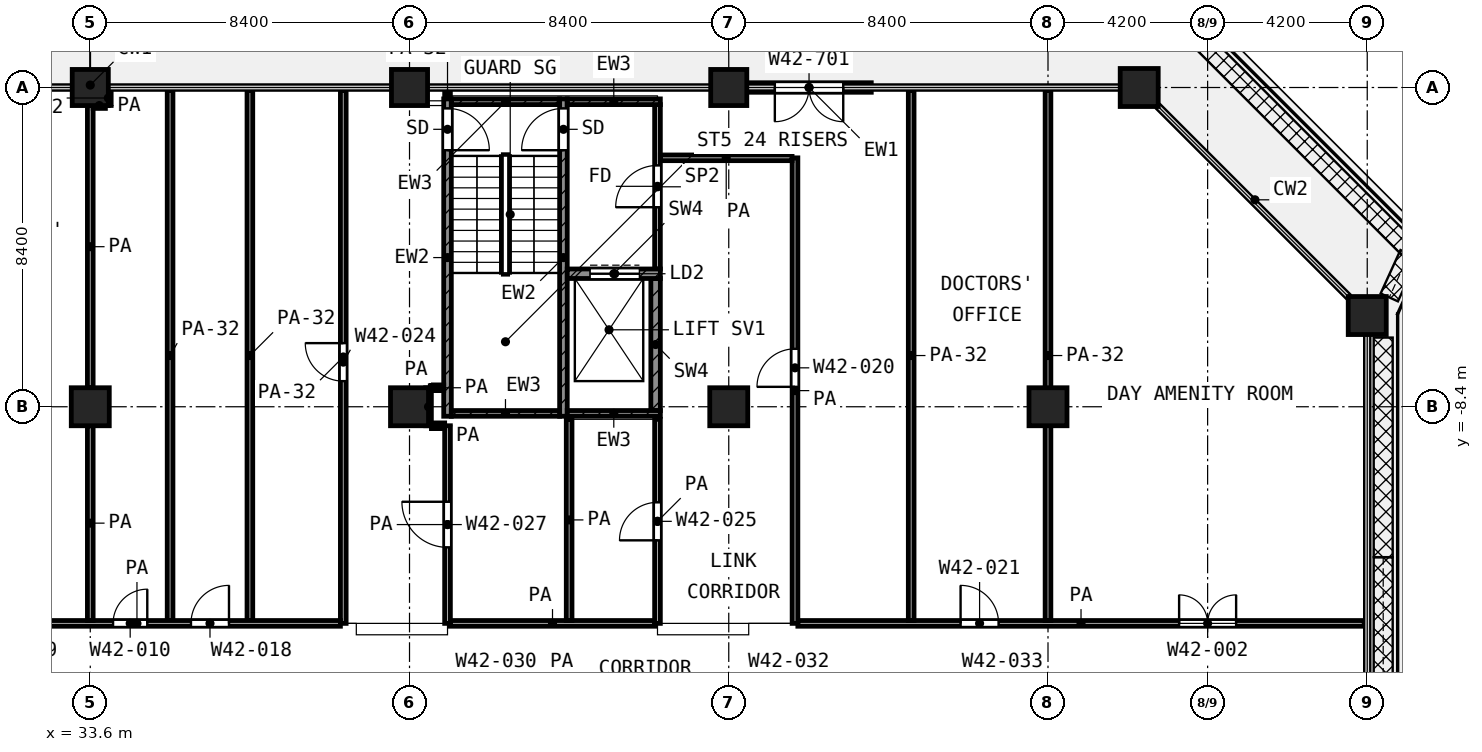
"""IFC4 building model, lengths in metres.
Left out: names, types, materials, properties, quantities, classifications, styles, units other than length and angle.
Written with IfcOpenShell. Run it as: python <this file> out.ifc"""

import sys

from ifc_helpers import new_model, si_unit, direction, frame, frame_2d, origin, origin_2d, place, context, subcontext, project, spatial, rectangle, extrude, element, fill, save


model = new_model("IFC4")
c1 = context("Model", 3, precision=1e-05, world=origin(), true_north=direction((0.0, 1.0)))
c2 = subcontext(c1, "Body", "Model", "MODEL_VIEW")
j1 = project(units=[si_unit("LENGTHUNIT", "METRE"), si_unit("PLANEANGLEUNIT", "RADIAN")], contexts=[c1])
p1 = place(None, origin())
s1 = spatial("IfcSite", under=j1, at=p1, CompositionType="ELEMENT")
p2 = place(p1, origin())
s2 = spatial("IfcBuilding", under=s1, at=p2, CompositionType="ELEMENT")
p3 = place(p2, frame((0.0, 0.0, 183.6)))
s3 = spatial("IfcBuildingStorey", under=s2, at=p3, CompositionType="ELEMENT", Elevation=183.6)
for number, where, z_axis, x_axis in (
    (1, (33.6, 0.0, 0.0), (0.0, 0.0, 1.0), (1.0, 0.0, 0.0)),
    (2, (42.0, 0.0, 0.0), (0.0, 0.0, 1.0), (1.0, 0.0, 0.0)),
    (3, (50.4, 0.0, 0.0), (0.0, 0.0, 1.0), (1.0, 0.0, 0.0)),
):
    element("IfcColumn", number, at=place(p3, frame(where, z_axis=z_axis, x_axis=x_axis)), inside=s3, PredefinedType="COLUMN", context=c2, shape_type="SweptSolid", body=[
        extrude(rectangle(XDim=0.95, YDim=0.95, at=origin_2d()), origin(), (0.0, 0.0, 1.0), 4.2),
    ])
for number, where, z_axis, x_axis in (
    (4, (61.2, 0.0, 0.0), (0.0, 0.0, 1.0), (1.0, 0.0, 0.0)),
    (5, (67.2, -6.0, 0.0), (0.0, 0.0, 1.0), (1.0, 0.0, 0.0)),
    (6, (33.6, -8.4, 0.0), (0.0, 0.0, 1.0), (1.0, 0.0, 0.0)),
    (7, (42.0, -8.4, 0.0), (0.0, 0.0, 1.0), (1.0, 0.0, 0.0)),
    (8, (50.4, -8.4, 0.0), (0.0, 0.0, 1.0), (1.0, 0.0, 0.0)),
    (9, (58.8, -8.4, 0.0), (0.0, 0.0, 1.0), (1.0, 0.0, 0.0)),
):
    element("IfcColumn", number, at=place(p3, frame(where, z_axis=z_axis, x_axis=x_axis)), inside=s3, PredefinedType="COLUMN", context=c2, shape_type="SweptSolid", body=[
        extrude(rectangle(XDim=1.0, YDim=1.0, at=origin_2d()), origin(), (0.0, 0.0, 1.0), 4.2),
    ])
p4 = place(p3, frame((54.15, 0.0, 0.0), z_axis=(0.0, 0.0, 1.0), x_axis=(-1.0, 0.0, 0.0)))
e10 = element("IfcWall", 10, at=p4, inside=s3, PredefinedType="SOLIDWALL", context=c2, shape_type="SweptSolid", body=[
    extrude(rectangle(XDim=3.275, YDim=0.25, at=frame_2d((1.637, 0.0))), origin(), (0.0, 0.0, 1.0), 2.58),
])
p5 = place(p4, frame((0.738, 0.0, 0.0)))
e11 = element("IfcOpeningElement", 11, at=p5, cuts=e10, PredefinedType="OPENING", context=c2, shape_type="SweptSolid", body=[
    extrude(rectangle(XDim=1.8, YDim=2.1, at=frame_2d((0.9, 1.05))), frame((0.0, 0.135, 0.0), z_axis=(0.0, -1.0, 0.0), x_axis=(1.0, 0.0, 0.0)), (0.0, 0.0, 1.0), 0.27),
])
p6 = place(p3, frame((43.0, -8.65, 0.0), z_axis=(0.0, 0.0, 1.0), x_axis=(0.0, 1.0, 0.0)))
e12 = element("IfcWall", 12, at=p6, inside=s3, PredefinedType="SHEAR", context=c2, shape_type="SweptSolid", body=[
    extrude(rectangle(XDim=8.35, YDim=0.2, at=frame_2d((4.175, 0.0))), origin(), (0.0, 0.0, 1.0), 3.6),
])
p7 = place(p6, frame((7.0, 0.0, 0.0)))
e13 = element("IfcOpeningElement", 13, at=p7, cuts=e12, PredefinedType="OPENING", context=c2, shape_type="SweptSolid", body=[
    extrude(rectangle(XDim=1.1, YDim=2.1, at=frame_2d((0.55, 1.05))), frame((0.0, 0.11, 0.0), z_axis=(0.0, -1.0, 0.0), x_axis=(1.0, 0.0, 0.0)), (0.0, 0.0, 1.0), 0.22),
])
p8 = place(p3, frame((46.05, -8.65, 0.0), z_axis=(0.0, 0.0, 1.0), x_axis=(0.0, 1.0, 0.0)))
e14 = element("IfcWall", 14, at=p8, inside=s3, PredefinedType="SHEAR", context=c2, shape_type="SweptSolid", body=[
    extrude(rectangle(XDim=8.35, YDim=0.2, at=frame_2d((4.175, 0.0))), origin(), (0.0, 0.0, 1.0), 3.6),
])
p9 = place(p8, frame((7.0, 0.0, 0.0)))
e15 = element("IfcOpeningElement", 15, at=p9, cuts=e14, PredefinedType="OPENING", context=c2, shape_type="SweptSolid", body=[
    extrude(rectangle(XDim=1.1, YDim=2.1, at=frame_2d((0.55, 1.05))), frame((0.0, 0.11, 0.0), z_axis=(0.0, -1.0, 0.0), x_axis=(1.0, 0.0, 0.0)), (0.0, 0.0, 1.0), 0.22),
])
p10 = place(p3, frame((43.1, -0.375, 0.0), z_axis=(0.0, 0.0, 1.0), x_axis=(1.0, 0.0, 0.0)))
e16 = element("IfcWall", 16, at=p10, inside=s3, PredefinedType="SHEAR", context=c2, shape_type="SweptSolid", body=[
    extrude(rectangle(XDim=2.85, YDim=0.15, at=frame_2d((1.425, 0.0))), origin(), (0.0, 0.0, 1.0), 3.6),
])
p11 = place(p3, frame((46.15, -0.375, 0.0), z_axis=(0.0, 0.0, 1.0), x_axis=(1.0, 0.0, 0.0)))
e17 = element("IfcWall", 17, at=p11, inside=s3, PredefinedType="SHEAR", context=c2, shape_type="SweptSolid", body=[
    extrude(rectangle(XDim=2.45, YDim=0.15, at=frame_2d((1.225, 0.0))), origin(), (0.0, 0.0, 1.0), 3.6),
])
p12 = place(p3, frame((43.1, -8.575, 0.0), z_axis=(0.0, 0.0, 1.0), x_axis=(1.0, 0.0, 0.0)))
e18 = element("IfcWall", 18, at=p12, inside=s3, PredefinedType="SHEAR", context=c2, shape_type="SweptSolid", body=[
    extrude(rectangle(XDim=2.85, YDim=0.15, at=frame_2d((1.425, 0.0))), origin(), (0.0, 0.0, 1.0), 3.6),
])
p13 = place(p3, frame((46.15, -8.575, 0.0), z_axis=(0.0, 0.0, 1.0), x_axis=(1.0, 0.0, 0.0)))
e19 = element("IfcWall", 19, at=p13, inside=s3, PredefinedType="SHEAR", context=c2, shape_type="SweptSolid", body=[
    extrude(rectangle(XDim=2.45, YDim=0.15, at=frame_2d((1.225, 0.0))), origin(), (0.0, 0.0, 1.0), 3.6),
])
p14 = place(p3, frame((46.15, -4.9, 0.0), z_axis=(0.0, 0.0, 1.0), x_axis=(1.0, 0.0, 0.0)))
e20 = element("IfcWall", 20, at=p14, inside=s3, PredefinedType="SHEAR", context=c2, shape_type="SweptSolid", body=[
    extrude(rectangle(XDim=2.45, YDim=0.25, at=frame_2d((1.225, 0.0))), origin(), (0.0, 0.0, 1.0), 3.6),
])
p15 = place(p14, frame((0.6, 0.0, 0.0)))
e21 = element("IfcOpeningElement", 21, at=p15, cuts=e20, PredefinedType="OPENING", context=c2, shape_type="SweptSolid", body=[
    extrude(rectangle(XDim=1.3, YDim=2.1, at=frame_2d((0.65, 1.05))), frame((0.0, 0.135, 0.0), z_axis=(0.0, -1.0, 0.0), x_axis=(1.0, 0.0, 0.0)), (0.0, 0.0, 1.0), 0.27),
])
p16 = place(p3, frame((48.475, -8.5, 0.0), z_axis=(0.0, 0.0, 1.0), x_axis=(0.0, 1.0, 0.0)))
e22 = element("IfcWall", 22, at=p16, inside=s3, PredefinedType="SHEAR", context=c2, shape_type="SweptSolid", body=[
    extrude(rectangle(XDim=3.475, YDim=0.25, at=frame_2d((1.738, 0.0))), origin(), (0.0, 0.0, 1.0), 3.6),
])
p17 = place(p3, frame((48.525, -4.775, 0.0), z_axis=(0.0, 0.0, 1.0), x_axis=(0.0, 1.0, 0.0)))
e23 = element("IfcWall", 23, at=p17, inside=s3, PredefinedType="PARTITIONING", context=c2, shape_type="SweptSolid", body=[
    extrude(rectangle(XDim=4.325, YDim=0.15, at=frame_2d((2.163, 0.0))), origin(), (0.0, 0.0, 1.0), 3.6),
])
p18 = place(p17, frame((1.625, 0.0, 0.0)))
e24 = element("IfcOpeningElement", 24, at=p18, cuts=e23, PredefinedType="OPENING", context=c2, shape_type="SweptSolid", body=[
    extrude(rectangle(XDim=1.1, YDim=2.1, at=frame_2d((0.55, 1.05))), frame((0.0, 0.085, 0.0), z_axis=(0.0, -1.0, 0.0), x_axis=(1.0, 0.0, 0.0)), (0.0, 0.0, 1.0), 0.17),
])
p19 = place(p3, frame((29.475, -14.1, 0.0), z_axis=(0.0, 0.0, 1.0), x_axis=(1.0, 0.0, 0.0)))
e25 = element("IfcWall", 25, at=p19, inside=s3, PredefinedType="PARTITIONING", context=c2, shape_type="SweptSolid", body=[
    extrude(rectangle(XDim=10.707, YDim=0.15, at=frame_2d((5.354, 0.0))), origin(), (0.0, 0.0, 1.0), 3.6),
])
p20 = place(p19, frame((1.675, 0.0, 0.0)))
e26 = element("IfcOpeningElement", 26, at=p20, cuts=e25, PredefinedType="OPENING", context=c2, shape_type="SweptSolid", body=[
    extrude(rectangle(XDim=1.0, YDim=2.1, at=frame_2d((0.5, 1.05))), frame((0.0, 0.085, 0.0), z_axis=(0.0, -1.0, 0.0), x_axis=(1.0, 0.0, 0.0)), (0.0, 0.0, 1.0), 0.17),
])
p21 = place(p19, frame((4.725, 0.0, 0.0)))
e27 = element("IfcOpeningElement", 27, at=p21, cuts=e25, PredefinedType="OPENING", context=c2, shape_type="SweptSolid", body=[
    extrude(rectangle(XDim=0.9, YDim=2.1, at=frame_2d((0.45, 1.05))), frame((0.0, 0.085, 0.0), z_axis=(0.0, -1.0, 0.0), x_axis=(1.0, 0.0, 0.0)), (0.0, 0.0, 1.0), 0.17),
])
p22 = place(p19, frame((6.775, 0.0, 0.0)))
e28 = element("IfcOpeningElement", 28, at=p22, cuts=e25, PredefinedType="OPENING", context=c2, shape_type="SweptSolid", body=[
    extrude(rectangle(XDim=1.0, YDim=2.1, at=frame_2d((0.5, 1.05))), frame((0.0, 0.085, 0.0), z_axis=(0.0, -1.0, 0.0), x_axis=(1.0, 0.0, 0.0)), (0.0, 0.0, 1.0), 0.17),
])
p23 = place(p3, frame((43.075, -14.1, 0.0), z_axis=(0.0, 0.0, 1.0), x_axis=(1.0, 0.0, 0.0)))
e29 = element("IfcWall", 29, at=p23, inside=s3, PredefinedType="PARTITIONING", context=c2, shape_type="SweptSolid", body=[
    extrude(rectangle(XDim=5.375, YDim=0.15, at=frame_2d((2.688, 0.0))), origin(), (0.0, 0.0, 1.0), 3.6),
])
p24 = place(p3, frame((52.218, -14.1, 0.0), z_axis=(0.0, 0.0, 1.0), x_axis=(1.0, 0.0, 0.0)))
e30 = element("IfcWall", 30, at=p24, inside=s3, PredefinedType="PARTITIONING", context=c2, shape_type="SweptSolid", body=[
    extrude(rectangle(XDim=14.902, YDim=0.15, at=frame_2d((7.451, 0.0))), origin(), (0.0, 0.0, 1.0), 3.6),
])
p25 = place(p24, frame((4.282, 0.0, 0.0)))
e31 = element("IfcOpeningElement", 31, at=p25, cuts=e30, PredefinedType="OPENING", context=c2, shape_type="SweptSolid", body=[
    extrude(rectangle(XDim=1.0, YDim=2.1, at=frame_2d((0.5, 1.05))), frame((0.0, 0.085, 0.0), z_axis=(0.0, -1.0, 0.0), x_axis=(1.0, 0.0, 0.0)), (0.0, 0.0, 1.0), 0.17),
])
p26 = place(p24, frame((10.032, 0.0, 0.0)))
e32 = element("IfcOpeningElement", 32, at=p26, cuts=e30, PredefinedType="OPENING", context=c2, shape_type="SweptSolid", body=[
    extrude(rectangle(XDim=1.5, YDim=2.1, at=frame_2d((0.75, 1.05))), frame((0.0, 0.085, 0.0), z_axis=(0.0, -1.0, 0.0), x_axis=(1.0, 0.0, 0.0)), (0.0, 0.0, 1.0), 0.17),
])
p27 = place(p3, frame((42.577, -8.9, 0.0), z_axis=(0.0, 0.0, 1.0), x_axis=(1.0, 0.0, 0.0)))
e33 = element("IfcWall", 33, at=p27, inside=s3, PredefinedType="PARTITIONING", context=c2, shape_type="SweptSolid", body=[
    extrude(rectangle(XDim=0.348, YDim=0.15, at=frame_2d((0.174, 0.0))), origin(), (0.0, 0.0, 1.0), 3.6),
])
p28 = place(p3, frame((42.577, -7.9, 0.0), z_axis=(0.0, 0.0, 1.0), x_axis=(1.0, 0.0, 0.0)))
e34 = element("IfcWall", 34, at=p28, inside=s3, PredefinedType="PARTITIONING", context=c2, shape_type="SweptSolid", body=[
    extrude(rectangle(XDim=0.323, YDim=0.15, at=frame_2d((0.162, 0.0))), origin(), (0.0, 0.0, 1.0), 3.6),
])
p29 = place(p3, frame((48.6, -1.85, 0.0), z_axis=(0.0, 0.0, 1.0), x_axis=(1.0, 0.0, 0.0)))
e35 = element("IfcWall", 35, at=p29, inside=s3, PredefinedType="PARTITIONING", context=c2, shape_type="SweptSolid", body=[
    extrude(rectangle(XDim=3.466, YDim=0.15, at=frame_2d((1.733, 0.0))), origin(), (0.0, 0.0, 1.0), 3.6),
])
p30 = place(p3, frame((33.677, -0.475, 0.0), z_axis=(0.0, 0.0, 1.0), x_axis=(1.0, 0.0, 0.0)))
e36 = element("IfcWall", 36, at=p30, inside=s3, PredefinedType="PARTITIONING", context=c2, shape_type="SweptSolid", body=[
    extrude(rectangle(XDim=0.321, YDim=0.15, at=frame_2d((0.161, 0.0))), origin(), (0.0, 0.0, 1.0), 3.6),
])
p31 = place(p3, frame((33.6, -14.025, 0.0), z_axis=(0.0, 0.0, 1.0), x_axis=(0.0, 1.0, 0.0)))
e37 = element("IfcWall", 37, at=p31, inside=s3, PredefinedType="PARTITIONING", context=c2, shape_type="SweptSolid", body=[
    extrude(rectangle(XDim=5.125, YDim=0.15, at=frame_2d((2.562, 0.0))), origin(), (0.0, 0.0, 1.0), 3.6),
])
p32 = place(p3, frame((33.6, -7.9, 0.0), z_axis=(0.0, 0.0, 1.0), x_axis=(0.0, 1.0, 0.0)))
e38 = element("IfcWall", 38, at=p32, inside=s3, PredefinedType="PARTITIONING", context=c2, shape_type="SweptSolid", body=[
    extrude(rectangle(XDim=7.423, YDim=0.15, at=frame_2d((3.711, 0.0))), origin(), (0.0, 0.0, 1.0), 3.6),
])
p33 = place(p3, frame((34.075, -0.473, 0.0), z_axis=(0.0, 0.0, 1.0), x_axis=(0.0, 1.0, 0.0)))
e39 = element("IfcWall", 39, at=p33, inside=s3, PredefinedType="PARTITIONING", context=c2, shape_type="SweptSolid", body=[
    extrude(rectangle(XDim=0.393, YDim=0.15, at=frame_2d((0.196, 0.0))), origin(), (0.0, 0.0, 1.0), 2.7),
])
for number, where, z_axis, x_axis in (
    (40, (35.7, -14.025, 0.0), (0.0, 0.0, 1.0), (0.0, 1.0, 0.0)),
    (41, (37.8, -14.025, 0.0), (0.0, 0.0, 1.0), (0.0, 1.0, 0.0)),
):
    element("IfcWall", number, at=place(p3, frame(where, z_axis=z_axis, x_axis=x_axis)), inside=s3, PredefinedType="PARTITIONING", context=c2, shape_type="SweptSolid", body=[
        extrude(rectangle(XDim=13.945, YDim=0.15, at=frame_2d((6.972, 0.0))), origin(), (0.0, 0.0, 1.0), 2.7),
    ])
p34 = place(p3, frame((40.257, -14.1, 0.0), z_axis=(0.0, 0.0, 1.0), x_axis=(0.0, 1.0, 0.0)))
e42 = element("IfcWall", 42, at=p34, inside=s3, PredefinedType="PARTITIONING", context=c2, shape_type="SweptSolid", body=[
    extrude(rectangle(XDim=14.02, YDim=0.15, at=frame_2d((7.01, 0.0))), origin(), (0.0, 0.0, 1.0), 2.7),
])
p35 = place(p34, frame((6.374, 0.0, 0.0)))
e43 = element("IfcOpeningElement", 43, at=p35, cuts=e42, PredefinedType="OPENING", context=c2, shape_type="SweptSolid", body=[
    extrude(rectangle(XDim=1.0, YDim=2.1, at=frame_2d((0.5, 1.05))), frame((0.0, 0.085, 0.0), z_axis=(0.0, -1.0, 0.0), x_axis=(1.0, 0.0, 0.0)), (0.0, 0.0, 1.0), 0.17),
])
p36 = place(p3, frame((42.5, -8.899, 0.0), z_axis=(0.0, 0.0, 1.0), x_axis=(0.0, 1.0, 0.0)))
e44 = element("IfcWall", 44, at=p36, inside=s3, PredefinedType="PARTITIONING", context=c2, shape_type="SweptSolid", body=[
    extrude(rectangle(XDim=0.997, YDim=0.15, at=frame_2d((0.499, 0.0))), origin(), (0.0, 0.0, 1.0), 3.6),
])
p37 = place(p3, frame((43.0, -14.1, 0.0), z_axis=(0.0, 0.0, 1.0), x_axis=(0.0, 1.0, 0.0)))
e45 = element("IfcWall", 45, at=p37, inside=s3, PredefinedType="PARTITIONING", context=c2, shape_type="SweptSolid", body=[
    extrude(rectangle(XDim=5.2, YDim=0.15, at=frame_2d((2.6, 0.0))), origin(), (0.0, 0.0, 1.0), 3.6),
])
p38 = place(p37, frame((2.0, 0.0, 0.0)))
e46 = element("IfcOpeningElement", 46, at=p38, cuts=e45, PredefinedType="OPENING", context=c2, shape_type="SweptSolid", body=[
    extrude(rectangle(XDim=1.2, YDim=2.1, at=frame_2d((0.6, 1.05))), frame((0.0, 0.085, 0.0), z_axis=(0.0, -1.0, 0.0), x_axis=(1.0, 0.0, 0.0)), (0.0, 0.0, 1.0), 0.17),
])
p39 = place(p3, frame((43.0, -0.27, 0.0), z_axis=(0.0, 0.0, 1.0), x_axis=(0.0, 1.0, 0.0)))
e47 = element("IfcWall", 47, at=p39, inside=s3, PredefinedType="PARTITIONING", context=c2, shape_type="SweptSolid", body=[
    extrude(rectangle(XDim=0.19, YDim=0.15, at=frame_2d((0.095, 0.0))), origin(), (0.0, 0.0, 1.0), 2.7),
])
p40 = place(p3, frame((46.2, -14.025, 0.0), z_axis=(0.0, 0.0, 1.0), x_axis=(0.0, 1.0, 0.0)))
e48 = element("IfcWall", 48, at=p40, inside=s3, PredefinedType="PARTITIONING", context=c2, shape_type="SweptSolid", body=[
    extrude(rectangle(XDim=5.295, YDim=0.15, at=frame_2d((2.647, 0.0))), origin(), (0.0, 0.0, 1.0), 3.6),
])
p41 = place(p3, frame((48.525, -14.1, 0.0), z_axis=(0.0, 0.0, 1.0), x_axis=(0.0, 1.0, 0.0)))
e49 = element("IfcWall", 49, at=p41, inside=s3, PredefinedType="PARTITIONING", context=c2, shape_type="SweptSolid", body=[
    extrude(rectangle(XDim=5.37, YDim=0.15, at=frame_2d((2.685, 0.0))), origin(), (0.0, 0.0, 1.0), 3.6),
])
p42 = place(p41, frame((2.185, 0.0, 0.0)))
e50 = element("IfcOpeningElement", 50, at=p42, cuts=e49, PredefinedType="OPENING", context=c2, shape_type="SweptSolid", body=[
    extrude(rectangle(XDim=1.0, YDim=2.1, at=frame_2d((0.5, 1.05))), frame((0.0, 0.085, 0.0), z_axis=(0.0, -1.0, 0.0), x_axis=(1.0, 0.0, 0.0)), (0.0, 0.0, 1.0), 0.17),
])
p43 = place(p3, frame((52.143, -14.1, 0.0), z_axis=(0.0, 0.0, 1.0), x_axis=(0.0, 1.0, 0.0)))
e51 = element("IfcWall", 51, at=p43, inside=s3, PredefinedType="PARTITIONING", context=c2, shape_type="SweptSolid", body=[
    extrude(rectangle(XDim=12.249, YDim=0.15, at=frame_2d((6.125, 0.0))), origin(), (0.0, 0.0, 1.0), 3.6),
])
p44 = place(p43, frame((6.224, 0.0, 0.0)))
e52 = element("IfcOpeningElement", 52, at=p44, cuts=e51, PredefinedType="OPENING", context=c2, shape_type="SweptSolid", body=[
    extrude(rectangle(XDim=1.0, YDim=2.1, at=frame_2d((0.5, 1.05))), frame((0.0, 0.085, 0.0), z_axis=(0.0, -1.0, 0.0), x_axis=(1.0, 0.0, 0.0)), (0.0, 0.0, 1.0), 0.17),
])
for number, where, z_axis, x_axis in (
    (53, (55.2, -14.025, 0.0), (0.0, 0.0, 1.0), (0.0, 1.0, 0.0)),
    (54, (58.8, -14.025, 0.0), (0.0, 0.0, 1.0), (0.0, 1.0, 0.0)),
):
    element("IfcWall", number, at=place(p3, frame(where, z_axis=z_axis, x_axis=x_axis)), inside=s3, PredefinedType="PARTITIONING", context=c2, shape_type="SweptSolid", body=[
        extrude(rectangle(XDim=13.945, YDim=0.15, at=frame_2d((6.972, 0.0))), origin(), (0.0, 0.0, 1.0), 2.7),
    ])
p45 = place(p5, origin())
e55 = element("IfcDoor", 55, at=p45, inside=s3, OperationType="DOUBLE_DOOR_SINGLE_SWING", PredefinedType="DOOR", context=c2, shape_type="SweptSolid", body=[
    extrude(rectangle(XDim=1.8, YDim=2.1, at=frame_2d((0.9, 1.05))), frame((0.0, 0.025, 0.0), z_axis=(0.0, -1.0, 0.0), x_axis=(1.0, 0.0, 0.0)), (0.0, 0.0, 1.0), 0.05),
])
fill(e11, e55)
p46 = place(p7, frame((1.1, 0.0, 0.0), z_axis=(0.0, 0.0, 1.0), x_axis=(-1.0, 0.0, 0.0)))
e56 = element("IfcDoor", 56, at=p46, inside=s3, OperationType="SINGLE_SWING_LEFT", PredefinedType="DOOR", context=c2, shape_type="SweptSolid", body=[
    extrude(rectangle(XDim=1.1, YDim=2.1, at=frame_2d((0.55, 1.05))), frame((0.0, 0.025, 0.0), z_axis=(0.0, -1.0, 0.0), x_axis=(1.0, 0.0, 0.0)), (0.0, 0.0, 1.0), 0.05),
])
fill(e13, e56)
p47 = place(p9, origin())
e57 = element("IfcDoor", 57, at=p47, inside=s3, OperationType="SINGLE_SWING_LEFT", PredefinedType="DOOR", context=c2, shape_type="SweptSolid", body=[
    extrude(rectangle(XDim=1.1, YDim=2.1, at=frame_2d((0.55, 1.05))), frame((0.0, 0.025, 0.0), z_axis=(0.0, -1.0, 0.0), x_axis=(1.0, 0.0, 0.0)), (0.0, 0.0, 1.0), 0.05),
])
fill(e15, e57)
p48 = place(p15, origin())
e58 = element("IfcDoor", 58, at=p48, inside=s3, OperationType="DOUBLE_DOOR_SLIDING", PredefinedType="DOOR", context=c2, shape_type="SweptSolid", body=[
    extrude(rectangle(XDim=1.3, YDim=2.1, at=frame_2d((0.65, 1.05))), frame((0.0, 0.025, 0.0), z_axis=(0.0, -1.0, 0.0), x_axis=(1.0, 0.0, 0.0)), (0.0, 0.0, 1.0), 0.05),
])
fill(e21, e58)
p49 = place(p18, origin())
e59 = element("IfcDoor", 59, at=p49, inside=s3, OperationType="SINGLE_SWING_LEFT", PredefinedType="DOOR", context=c2, shape_type="SweptSolid", body=[
    extrude(rectangle(XDim=1.1, YDim=2.1, at=frame_2d((0.55, 1.05))), frame((0.0, 0.025, 0.0), z_axis=(0.0, -1.0, 0.0), x_axis=(1.0, 0.0, 0.0)), (0.0, 0.0, 1.0), 0.05),
])
fill(e24, e59)
p50 = place(p38, origin())
e60 = element("IfcDoor", 60, at=p50, inside=s3, OperationType="SINGLE_SWING_RIGHT", PredefinedType="DOOR", context=c2, shape_type="SweptSolid", body=[
    extrude(rectangle(XDim=1.2, YDim=2.1, at=frame_2d((0.6, 1.05))), frame((0.0, 0.025, 0.0), z_axis=(0.0, -1.0, 0.0), x_axis=(1.0, 0.0, 0.0)), (0.0, 0.0, 1.0), 0.05),
])
fill(e46, e60)
p51 = place(p44, origin())
e61 = element("IfcDoor", 61, at=p51, inside=s3, OperationType="SINGLE_SWING_LEFT", PredefinedType="DOOR", context=c2, shape_type="SweptSolid", body=[
    extrude(rectangle(XDim=1.0, YDim=2.1, at=frame_2d((0.5, 1.05))), frame((0.0, 0.025, 0.0), z_axis=(0.0, -1.0, 0.0), x_axis=(1.0, 0.0, 0.0)), (0.0, 0.0, 1.0), 0.05),
])
fill(e52, e61)
p52 = place(p25, origin())
e62 = element("IfcDoor", 62, at=p52, inside=s3, OperationType="SINGLE_SWING_LEFT", PredefinedType="DOOR", context=c2, shape_type="SweptSolid", body=[
    extrude(rectangle(XDim=1.0, YDim=2.1, at=frame_2d((0.5, 1.05))), frame((0.0, 0.025, 0.0), z_axis=(0.0, -1.0, 0.0), x_axis=(1.0, 0.0, 0.0)), (0.0, 0.0, 1.0), 0.05),
])
fill(e31, e62)
p53 = place(p26, origin())
e63 = element("IfcDoor", 63, at=p53, inside=s3, OperationType="DOUBLE_DOOR_SINGLE_SWING", PredefinedType="DOOR", context=c2, shape_type="SweptSolid", body=[
    extrude(rectangle(XDim=1.5, YDim=2.1, at=frame_2d((0.75, 1.05))), frame((0.0, 0.025, 0.0), z_axis=(0.0, -1.0, 0.0), x_axis=(1.0, 0.0, 0.0)), (0.0, 0.0, 1.0), 0.05),
])
fill(e32, e63)
p54 = place(p21, origin())
e64 = element("IfcDoor", 64, at=p54, inside=s3, OperationType="SINGLE_SWING_RIGHT", PredefinedType="DOOR", context=c2, shape_type="SweptSolid", body=[
    extrude(rectangle(XDim=0.9, YDim=2.1, at=frame_2d((0.45, 1.05))), frame((0.0, 0.025, 0.0), z_axis=(0.0, -1.0, 0.0), x_axis=(1.0, 0.0, 0.0)), (0.0, 0.0, 1.0), 0.05),
])
fill(e27, e64)
p55 = place(p22, origin())
e65 = element("IfcDoor", 65, at=p55, inside=s3, OperationType="SINGLE_SWING_RIGHT", PredefinedType="DOOR", context=c2, shape_type="SweptSolid", body=[
    extrude(rectangle(XDim=1.0, YDim=2.1, at=frame_2d((0.5, 1.05))), frame((0.0, 0.025, 0.0), z_axis=(0.0, -1.0, 0.0), x_axis=(1.0, 0.0, 0.0)), (0.0, 0.0, 1.0), 0.05),
])
fill(e28, e65)
p56 = place(p35, origin())
e66 = element("IfcDoor", 66, at=p56, inside=s3, OperationType="SINGLE_SWING_RIGHT", PredefinedType="DOOR", context=c2, shape_type="SweptSolid", body=[
    extrude(rectangle(XDim=1.0, YDim=2.1, at=frame_2d((0.5, 1.05))), frame((0.0, 0.025, 0.0), z_axis=(0.0, -1.0, 0.0), x_axis=(1.0, 0.0, 0.0)), (0.0, 0.0, 1.0), 0.05),
])
fill(e43, e66)
p57 = place(p42, origin())
e67 = element("IfcDoor", 67, at=p57, inside=s3, OperationType="SINGLE_SWING_LEFT", PredefinedType="DOOR", context=c2, shape_type="SweptSolid", body=[
    extrude(rectangle(XDim=1.0, YDim=2.1, at=frame_2d((0.5, 1.05))), frame((0.0, 0.025, 0.0), z_axis=(0.0, -1.0, 0.0), x_axis=(1.0, 0.0, 0.0)), (0.0, 0.0, 1.0), 0.05),
])
fill(e50, e67)
save(model, sys.argv[1])
